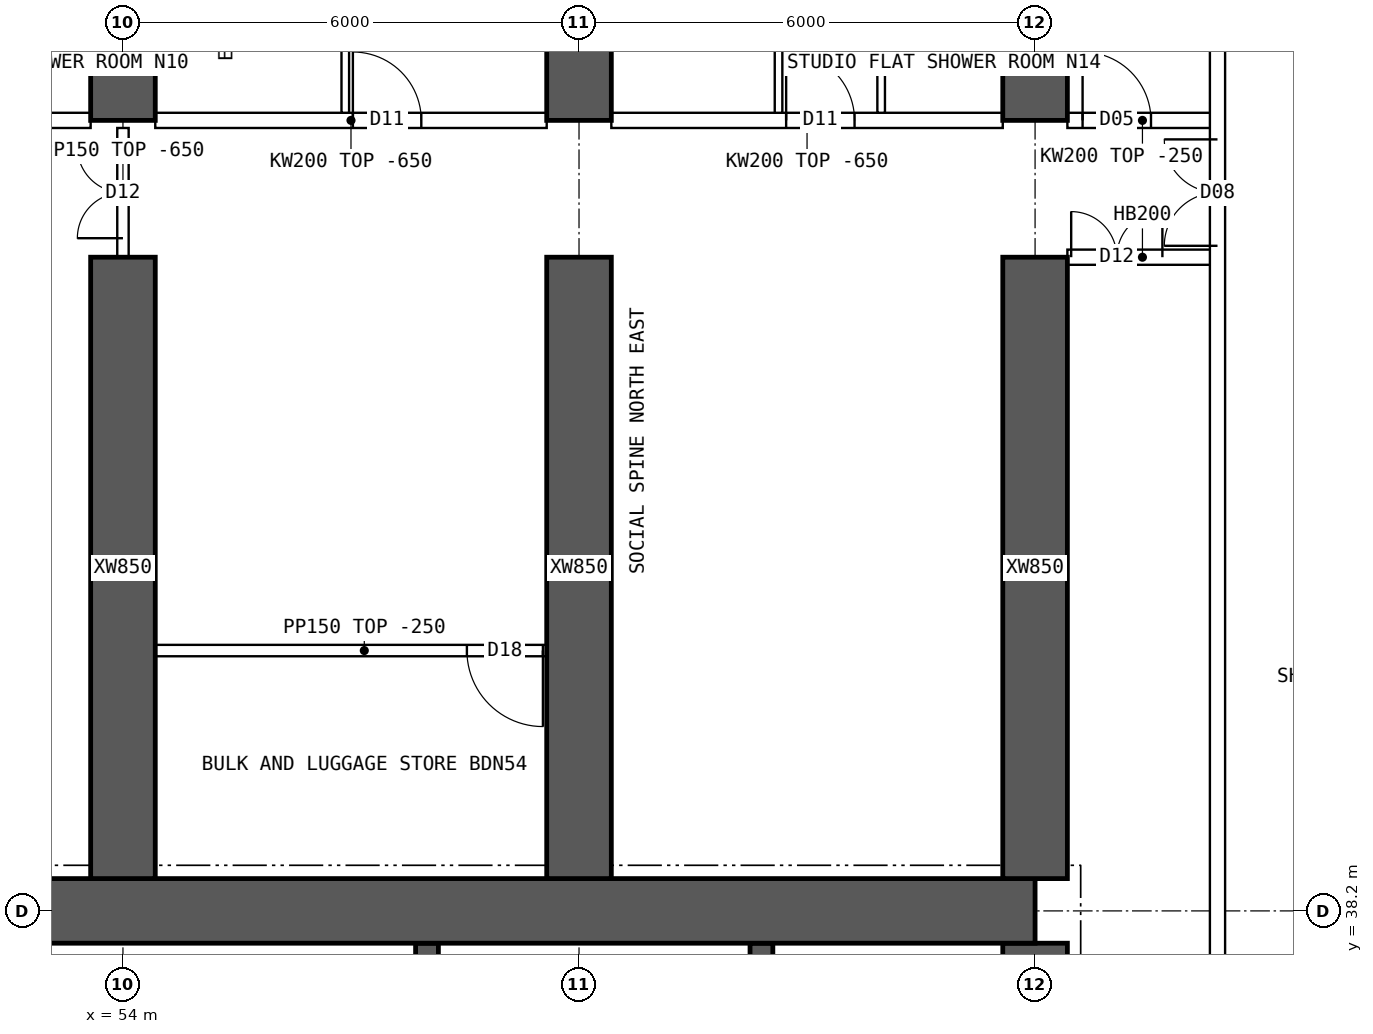
"""IFC4 building model, lengths in metres.
Left out: names, types, materials, properties, quantities, classifications, styles, units other than length and angle.
Written with IfcOpenShell. Run it as: python <this file> out.ifc"""

import sys

from ifc_helpers import new_model, si_unit, direction, frame, frame_2d, origin, place, context, subcontext, project, spatial, polyline, rectangle, outline, extrude, element, fill, save


model = new_model("IFC4")
c1 = context("Model", 3, precision=1e-05, world=origin(), true_north=direction((0.0, 1.0)))
c2 = subcontext(c1, "Body", "Model", "MODEL_VIEW")
j1 = project(units=[si_unit("LENGTHUNIT", "METRE"), si_unit("PLANEANGLEUNIT", "RADIAN")], contexts=[c1])
p1 = place(None, origin())
s1 = spatial("IfcSite", under=j1, at=p1, CompositionType="ELEMENT")
p2 = place(p1, origin())
s2 = spatial("IfcBuilding", under=s1, at=p2, CompositionType="ELEMENT")
p3 = place(p2, frame((0.0, 0.0, 182.35)))
s3 = spatial("IfcBuildingStorey", under=s2, at=p3, CompositionType="ELEMENT", Elevation=182.35)
p4 = place(p3, frame((18.0, 38.2, 0.0), z_axis=(0.0, 0.0, 1.0), x_axis=(1.0, 0.0, 0.0)))
e1 = element("IfcWall", 1, at=p4, inside=s3, PredefinedType="SHEAR", context=c2, shape_type="SweptSolid", body=[
    extrude(rectangle(XDim=48.0, YDim=0.85, at=frame_2d((24.0, 0.0))), origin(), (0.0, 0.0, 1.0), 3.75),
])
p5 = place(p3, frame((66.0, 26.225, 0.0), z_axis=(0.0, 0.0, 1.0), x_axis=(0.0, 1.0, 0.0)))
e2 = element("IfcWall", 2, at=p5, inside=s3, PredefinedType="SHEAR", context=c2, shape_type="SweptSolid", body=[
    extrude(rectangle(XDim=11.55, YDim=0.85, at=frame_2d((5.775, 0.0))), origin(), (0.0, 0.0, 1.0), 3.75),
])
p6 = place(p5, frame((5.075, 0.0, 0.0)))
e3 = element("IfcOpeningElement", 3, at=p6, cuts=e2, PredefinedType="OPENING", context=c2, shape_type="SweptSolid", body=[
    extrude(rectangle(XDim=1.2, YDim=2.1, at=frame_2d((0.6, 1.05))), frame((0.0, 0.435, 0.0), z_axis=(0.0, -1.0, 0.0), x_axis=(1.0, 0.0, 0.0)), (0.0, 0.0, 1.0), 0.87),
])
for number, where, z_axis, x_axis in (
    (4, (62.4, 34.75, 0.0), (0.0, 0.0, 1.0), (0.0, 1.0, 0.0)),
    (5, (58.0, 34.75, 0.0), (0.0, 0.0, 1.0), (0.0, 1.0, 0.0)),
):
    element("IfcWall", number, at=place(p3, frame(where, z_axis=z_axis, x_axis=x_axis)), inside=s3, PredefinedType="SHEAR", context=c2, shape_type="SweptSolid", body=[
        extrude(rectangle(XDim=3.025, YDim=0.3, at=frame_2d((1.512, 0.0))), origin(), (0.0, 0.0, 1.0), 3.75),
    ])
p7 = place(p3, frame((54.0, 48.6, 0.0), z_axis=(0.0, 0.0, 1.0), x_axis=(0.0, 1.0, 0.0)))
e6 = element("IfcWall", 6, at=p7, inside=s3, PredefinedType="SHEAR", context=c2, shape_type="SweptSolid", body=[
    extrude(rectangle(XDim=5.4, YDim=0.85, at=frame_2d((2.7, 0.0))), origin(), (0.0, 0.0, 1.0), 3.75),
])
p8 = place(p3, frame((54.0, 38.625, 0.0), z_axis=(0.0, 0.0, 1.0), x_axis=(0.0, 1.0, 0.0)))
e7 = element("IfcWall", 7, at=p8, inside=s3, PredefinedType="SHEAR", context=c2, shape_type="SweptSolid", body=[
    extrude(rectangle(XDim=8.175, YDim=0.85, at=frame_2d((4.087, 0.0))), origin(), (0.0, 0.0, 1.0), 3.75),
])
p9 = place(p3, frame((60.0, 48.6, 0.0), z_axis=(0.0, 0.0, 1.0), x_axis=(0.0, 1.0, 0.0)))
e8 = element("IfcWall", 8, at=p9, inside=s3, PredefinedType="SHEAR", context=c2, shape_type="SweptSolid", body=[
    extrude(rectangle(XDim=5.4, YDim=0.85, at=frame_2d((2.7, 0.0))), origin(), (0.0, 0.0, 1.0), 3.75),
])
p10 = place(p3, frame((60.0, 38.625, 0.0), z_axis=(0.0, 0.0, 1.0), x_axis=(0.0, 1.0, 0.0)))
e9 = element("IfcWall", 9, at=p10, inside=s3, PredefinedType="SHEAR", context=c2, shape_type="SweptSolid", body=[
    extrude(rectangle(XDim=8.175, YDim=0.85, at=frame_2d((4.087, 0.0))), origin(), (0.0, 0.0, 1.0), 3.75),
])
p11 = place(p3, frame((66.0, 48.6, 0.0), z_axis=(0.0, 0.0, 1.0), x_axis=(0.0, 1.0, 0.0)))
e10 = element("IfcWall", 10, at=p11, inside=s3, PredefinedType="SHEAR", context=c2, shape_type="SweptSolid", body=[
    extrude(rectangle(XDim=5.4, YDim=0.85, at=frame_2d((2.7, 0.0))), origin(), (0.0, 0.0, 1.0), 3.75),
])
p12 = place(p3, frame((66.0, 38.625, 0.0), z_axis=(0.0, 0.0, 1.0), x_axis=(0.0, 1.0, 0.0)))
e11 = element("IfcWall", 11, at=p12, inside=s3, PredefinedType="SHEAR", context=c2, shape_type="SweptSolid", body=[
    extrude(rectangle(XDim=8.175, YDim=0.85, at=frame_2d((4.087, 0.0))), origin(), (0.0, 0.0, 1.0), 3.75),
])
p13 = place(p3, frame((48.425, 48.6, 0.0), z_axis=(0.0, 0.0, 1.0), x_axis=(1.0, 0.0, 0.0)))
e12 = element("IfcWall", 12, at=p13, inside=s3, PredefinedType="SOLIDWALL", context=c2, shape_type="SweptSolid", body=[
    extrude(outline(polyline([(0.0, 0.0), (5.15, 0.0), (5.15, 3.1), (0.0, 3.1), (0.0, 0.0)])), frame((0.0, 0.1, 0.0), z_axis=(0.0, -1.0, 0.0), x_axis=(1.0, 0.0, 0.0)), (0.0, 0.0, 1.0), 0.2),
])
p14 = place(p13, frame((2.3, 0.0, 0.0)))
e13 = element("IfcOpeningElement", 13, at=p14, cuts=e12, PredefinedType="OPENING", context=c2, shape_type="SweptSolid", body=[
    extrude(rectangle(XDim=0.9, YDim=2.1, at=frame_2d((0.45, 1.05))), frame((0.0, 0.11, 0.0), z_axis=(0.0, -1.0, 0.0), x_axis=(1.0, 0.0, 0.0)), (0.0, 0.0, 1.0), 0.22),
])
p15 = place(p3, frame((54.425, 48.6, 0.0), z_axis=(0.0, 0.0, 1.0), x_axis=(1.0, 0.0, 0.0)))
e14 = element("IfcWall", 14, at=p15, inside=s3, PredefinedType="SOLIDWALL", context=c2, shape_type="SweptSolid", body=[
    extrude(outline(polyline([(0.0, 0.0), (5.15, 0.0), (5.15, 3.1), (0.0, 3.1), (0.0, 0.0)])), frame((0.0, 0.1, 0.0), z_axis=(0.0, -1.0, 0.0), x_axis=(1.0, 0.0, 0.0)), (0.0, 0.0, 1.0), 0.2),
])
p16 = place(p15, frame((2.6, 0.0, 0.0)))
e15 = element("IfcOpeningElement", 15, at=p16, cuts=e14, PredefinedType="OPENING", context=c2, shape_type="SweptSolid", body=[
    extrude(rectangle(XDim=0.9, YDim=2.1, at=frame_2d((0.45, 1.05))), frame((0.0, 0.11, 0.0), z_axis=(0.0, -1.0, 0.0), x_axis=(1.0, 0.0, 0.0)), (0.0, 0.0, 1.0), 0.22),
])
p17 = place(p3, frame((60.425, 48.6, 0.0), z_axis=(0.0, 0.0, 1.0), x_axis=(1.0, 0.0, 0.0)))
e16 = element("IfcWall", 16, at=p17, inside=s3, PredefinedType="SOLIDWALL", context=c2, shape_type="SweptSolid", body=[
    extrude(outline(polyline([(0.0, 0.0), (5.15, 0.0), (5.15, 3.1), (0.0, 3.1), (0.0, 0.0)])), frame((0.0, 0.1, 0.0), z_axis=(0.0, -1.0, 0.0), x_axis=(1.0, 0.0, 0.0)), (0.0, 0.0, 1.0), 0.2),
])
p18 = place(p17, frame((2.3, 0.0, 0.0)))
e17 = element("IfcOpeningElement", 17, at=p18, cuts=e16, PredefinedType="OPENING", context=c2, shape_type="SweptSolid", body=[
    extrude(rectangle(XDim=0.9, YDim=2.1, at=frame_2d((0.45, 1.05))), frame((0.0, 0.11, 0.0), z_axis=(0.0, -1.0, 0.0), x_axis=(1.0, 0.0, 0.0)), (0.0, 0.0, 1.0), 0.22),
])
p19 = place(p3, frame((66.425, 48.6, 0.0), z_axis=(0.0, 0.0, 1.0), x_axis=(1.0, 0.0, 0.0)))
e18 = element("IfcWall", 18, at=p19, inside=s3, PredefinedType="SOLIDWALL", context=c2, shape_type="SweptSolid", body=[
    extrude(rectangle(XDim=1.975, YDim=0.2, at=frame_2d((0.987, 0.0))), origin(), (0.0, 0.0, 1.0), 3.5),
])
p20 = place(p19, frame((0.2, 0.0, 0.0)))
e19 = element("IfcOpeningElement", 19, at=p20, cuts=e18, PredefinedType="OPENING", context=c2, shape_type="SweptSolid", body=[
    extrude(rectangle(XDim=0.9, YDim=2.1, at=frame_2d((0.45, 1.05))), frame((0.0, 0.11, 0.0), z_axis=(0.0, -1.0, 0.0), x_axis=(1.0, 0.0, 0.0)), (0.0, 0.0, 1.0), 0.22),
])
p21 = place(p3, frame((66.425, 46.8, 0.0), z_axis=(0.0, 0.0, 1.0), x_axis=(1.0, 0.0, 0.0)))
e20 = element("IfcWall", 20, at=p21, inside=s3, PredefinedType="SOLIDWALL", context=c2, shape_type="SweptSolid", body=[
    extrude(rectangle(XDim=1.975, YDim=0.2, at=frame_2d((0.987, 0.0))), origin(), (0.0, 0.0, 1.0), 3.5),
])
p22 = place(p21, frame((0.05, 0.0, 0.0)))
e21 = element("IfcOpeningElement", 21, at=p22, cuts=e20, PredefinedType="OPENING", context=c2, shape_type="SweptSolid", body=[
    extrude(rectangle(XDim=1.2, YDim=2.1, at=frame_2d((0.6, 1.05))), frame((0.0, 0.11, 0.0), z_axis=(0.0, -1.0, 0.0), x_axis=(1.0, 0.0, 0.0)), (0.0, 0.0, 1.0), 0.22),
])
p23 = place(p3, frame((56.925, 51.85, 0.0), z_axis=(0.0, 0.0, 1.0), x_axis=(0.0, -1.0, 0.0)))
e22 = element("IfcWall", 22, at=p23, inside=s3, PredefinedType="PARTITIONING", context=c2, shape_type="SweptSolid", body=[
    extrude(outline(polyline([(0.0, 0.0), (3.15, 0.0), (3.15, 3.1), (3.102, 3.1), (3.1, 3.5), (0.0, 3.5), (0.0, 0.0)])), frame((0.0, 0.05, 0.0), z_axis=(0.0, -1.0, 0.0), x_axis=(1.0, 0.0, 0.0)), (0.0, 0.0, 1.0), 0.1),
])
p24 = place(p3, frame((62.625, 51.05, 0.0), z_axis=(0.0, 0.0, 1.0), x_axis=(0.0, -1.0, 0.0)))
e23 = element("IfcWall", 23, at=p24, inside=s3, PredefinedType="PARTITIONING", context=c2, shape_type="SweptSolid", body=[
    extrude(outline(polyline([(0.0, 0.0), (2.35, 0.0), (2.35, 3.1), (2.302, 3.1), (2.3, 3.5), (0.0, 3.5), (0.0, 0.0)])), frame((0.0, 0.05, 0.0), z_axis=(0.0, -1.0, 0.0), x_axis=(1.0, 0.0, 0.0)), (0.0, 0.0, 1.0), 0.1),
])
p25 = place(p3, frame((63.975, 51.05, 0.0), z_axis=(0.0, 0.0, 1.0), x_axis=(0.0, -1.0, 0.0)))
e24 = element("IfcWall", 24, at=p25, inside=s3, PredefinedType="PARTITIONING", context=c2, shape_type="SweptSolid", body=[
    extrude(outline(polyline([(0.0, 0.0), (2.35, 0.0), (2.35, 3.1), (2.302, 3.1), (2.3, 3.5), (0.0, 3.5), (0.0, 0.0)])), frame((0.0, 0.05, 0.0), z_axis=(0.0, -1.0, 0.0), x_axis=(1.0, 0.0, 0.0)), (0.0, 0.0, 1.0), 0.1),
])
p26 = place(p25, frame((0.8, 0.0, 0.0)))
e25 = element("IfcOpeningElement", 25, at=p26, cuts=e24, PredefinedType="OPENING", context=c2, shape_type="SweptSolid", body=[
    extrude(rectangle(XDim=0.8, YDim=2.1, at=frame_2d((0.4, 1.05))), frame((0.0, 0.06, 0.0), z_axis=(0.0, -1.0, 0.0), x_axis=(1.0, 0.0, 0.0)), (0.0, 0.0, 1.0), 0.12),
])
p27 = place(p3, frame((59.925, 41.625, 0.0), z_axis=(0.0, 0.0, 1.0), x_axis=(-1.0, 0.0, 0.0)))
e26 = element("IfcWall", 26, at=p27, inside=s3, PredefinedType="PARTITIONING", context=c2, shape_type="SweptSolid", body=[
    extrude(rectangle(XDim=5.5, YDim=0.15, at=frame_2d((2.75, 0.0))), origin(), (0.0, 0.0, 1.0), 3.5),
])
p28 = place(p27, frame((0.4, 0.0, 0.0)))
e27 = element("IfcOpeningElement", 27, at=p28, cuts=e26, PredefinedType="OPENING", context=c2, shape_type="SweptSolid", body=[
    extrude(rectangle(XDim=1.0, YDim=2.1, at=frame_2d((0.5, 1.05))), frame((0.0, 0.085, 0.0), z_axis=(0.0, -1.0, 0.0), x_axis=(1.0, 0.0, 0.0)), (0.0, 0.0, 1.0), 0.17),
])
p29 = place(p3, frame((54.0, 46.8, 0.0), z_axis=(0.0, 0.0, 1.0), x_axis=(0.0, 1.0, 0.0)))
e28 = element("IfcWall", 28, at=p29, inside=s3, PredefinedType="PARTITIONING", context=c2, shape_type="SweptSolid", body=[
    extrude(outline(polyline([(0.0, 0.0), (1.7, 0.0), (1.7, 3.1), (0.0, 3.1), (0.0, 0.0)])), frame((0.0, 0.075, 0.0), z_axis=(0.0, -1.0, 0.0), x_axis=(1.0, 0.0, 0.0)), (0.0, 0.0, 1.0), 0.15),
])
p30 = place(p29, frame((0.25, 0.0, 0.0)))
e29 = element("IfcOpeningElement", 29, at=p30, cuts=e28, PredefinedType="OPENING", context=c2, shape_type="SweptSolid", body=[
    extrude(rectangle(XDim=1.2, YDim=2.1, at=frame_2d((0.6, 1.05))), frame((0.0, 0.085, 0.0), z_axis=(0.0, -1.0, 0.0), x_axis=(1.0, 0.0, 0.0)), (0.0, 0.0, 1.0), 0.17),
])
p31 = place(p3, frame((68.4, 10.446, 0.0), z_axis=(0.0, 0.0, 1.0), x_axis=(0.0, 1.0, 0.0)))
e30 = element("IfcWall", 30, at=p31, inside=s3, PredefinedType="SOLIDWALL", context=c2, shape_type="SweptSolid", body=[
    extrude(rectangle(XDim=43.107, YDim=0.2, at=frame_2d((21.554, 0.0))), origin(), (0.0, 0.0, 1.0), 3.5),
])
p32 = place(p31, frame((5.104, 0.0, 0.0)))
e31 = element("IfcOpeningElement", 31, at=p32, cuts=e30, PredefinedType="OPENING", context=c2, shape_type="SweptSolid", body=[
    extrude(rectangle(XDim=1.4, YDim=2.1, at=frame_2d((0.7, 1.05))), frame((0.0, 0.11, 0.0), z_axis=(0.0, -1.0, 0.0), x_axis=(1.0, 0.0, 0.0)), (0.0, 0.0, 1.0), 0.22),
])
p33 = place(p31, frame((36.504, 0.0, 0.0)))
e32 = element("IfcOpeningElement", 32, at=p33, cuts=e30, PredefinedType="OPENING", context=c2, shape_type="SweptSolid", body=[
    extrude(rectangle(XDim=1.4, YDim=2.1, at=frame_2d((0.7, 1.05))), frame((0.0, 0.11, 0.0), z_axis=(0.0, -1.0, 0.0), x_axis=(1.0, 0.0, 0.0)), (0.0, 0.0, 1.0), 0.22),
])
p34 = place(p22, origin())
e33 = element("IfcDoor", 33, at=p34, inside=s3, OperationType="DOUBLE_DOOR_SINGLE_SWING", PredefinedType="DOOR", context=c2, shape_type="SweptSolid", body=[
    extrude(rectangle(XDim=1.2, YDim=2.1, at=frame_2d((0.6, 1.05))), frame((0.0, 0.025, 0.0), z_axis=(0.0, -1.0, 0.0), x_axis=(1.0, 0.0, 0.0)), (0.0, 0.0, 1.0), 0.05),
])
fill(e21, e33)
p35 = place(p16, origin())
e34 = element("IfcDoor", 34, at=p35, inside=s3, OperationType="SINGLE_SWING_LEFT", PredefinedType="DOOR", context=c2, shape_type="SweptSolid", body=[
    extrude(rectangle(XDim=0.9, YDim=2.1, at=frame_2d((0.45, 1.05))), frame((0.0, 0.025, 0.0), z_axis=(0.0, -1.0, 0.0), x_axis=(1.0, 0.0, 0.0)), (0.0, 0.0, 1.0), 0.05),
])
fill(e15, e34)
p36 = place(p26, origin())
e35 = element("IfcDoor", 35, at=p36, inside=s3, OperationType="SINGLE_SWING_RIGHT", PredefinedType="DOOR", context=c2, shape_type="SweptSolid", body=[
    extrude(rectangle(XDim=0.8, YDim=2.1, at=frame_2d((0.4, 1.05))), frame((0.0, 0.025, 0.0), z_axis=(0.0, -1.0, 0.0), x_axis=(1.0, 0.0, 0.0)), (0.0, 0.0, 1.0), 0.05),
])
fill(e25, e35)
p37 = place(p18, origin())
e36 = element("IfcDoor", 36, at=p37, inside=s3, OperationType="SINGLE_SWING_LEFT", PredefinedType="DOOR", context=c2, shape_type="SweptSolid", body=[
    extrude(rectangle(XDim=0.9, YDim=2.1, at=frame_2d((0.45, 1.05))), frame((0.0, 0.025, 0.0), z_axis=(0.0, -1.0, 0.0), x_axis=(1.0, 0.0, 0.0)), (0.0, 0.0, 1.0), 0.05),
])
fill(e17, e36)
p38 = place(p28, origin())
e37 = element("IfcDoor", 37, at=p38, inside=s3, OperationType="SINGLE_SWING_LEFT", PredefinedType="DOOR", context=c2, shape_type="SweptSolid", body=[
    extrude(rectangle(XDim=1.0, YDim=2.1, at=frame_2d((0.5, 1.05))), frame((0.0, 0.025, 0.0), z_axis=(0.0, -1.0, 0.0), x_axis=(1.0, 0.0, 0.0)), (0.0, 0.0, 1.0), 0.05),
])
fill(e27, e37)
p39 = place(p30, origin())
e38 = element("IfcDoor", 38, at=p39, inside=s3, OperationType="DOUBLE_DOOR_SINGLE_SWING", PredefinedType="DOOR", context=c2, shape_type="SweptSolid", body=[
    extrude(rectangle(XDim=1.2, YDim=2.1, at=frame_2d((0.6, 1.05))), frame((0.0, 0.025, 0.0), z_axis=(0.0, -1.0, 0.0), x_axis=(1.0, 0.0, 0.0)), (0.0, 0.0, 1.0), 0.05),
])
fill(e29, e38)
p40 = place(p33, origin())
e39 = element("IfcDoor", 39, at=p40, inside=s3, OperationType="DOUBLE_DOOR_SINGLE_SWING", PredefinedType="DOOR", context=c2, shape_type="SweptSolid", body=[
    extrude(rectangle(XDim=1.4, YDim=2.1, at=frame_2d((0.7, 1.05))), frame((0.0, 0.025, 0.0), z_axis=(0.0, -1.0, 0.0), x_axis=(1.0, 0.0, 0.0)), (0.0, 0.0, 1.0), 0.05),
])
fill(e32, e39)
p41 = place(p20, origin())
e40 = element("IfcDoor", 40, at=p41, inside=s3, OperationType="SINGLE_SWING_LEFT", PredefinedType="DOOR", context=c2, shape_type="SweptSolid", body=[
    extrude(rectangle(XDim=0.9, YDim=2.1, at=frame_2d((0.45, 1.05))), frame((0.0, 0.025, 0.0), z_axis=(0.0, -1.0, 0.0), x_axis=(1.0, 0.0, 0.0)), (0.0, 0.0, 1.0), 0.05),
])
fill(e19, e40)
save(model, sys.argv[1])
